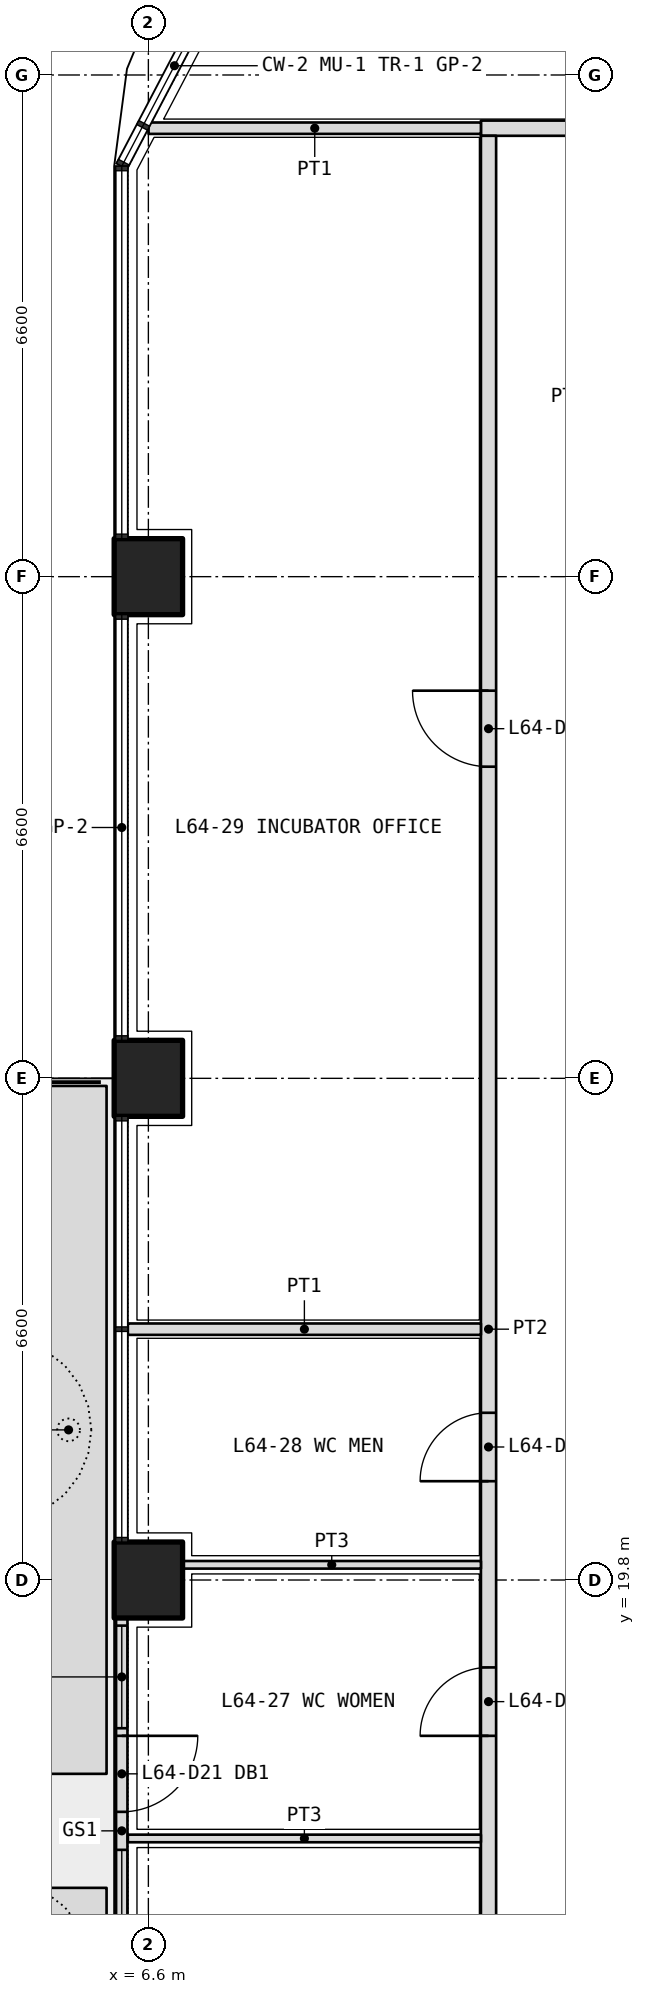
"""IFC4 building model, lengths in metres.
Left out: names, types, materials, properties, quantities, classifications, styles, units other than length and angle.
Written with IfcOpenShell. Run it as: python <this file> out.ifc"""

import sys

from ifc_helpers import new_model, si_unit, direction, frame, frame_2d, origin, origin_2d, place, context, subcontext, project, spatial, polyline, rectangle, outline, extrude, element, fill, save


model = new_model("IFC4")
c1 = context("Model", 3, precision=1e-05, world=origin(), true_north=direction((0.0, 1.0)))
c2 = subcontext(c1, "Body", "Model", "MODEL_VIEW")
j1 = project(units=[si_unit("LENGTHUNIT", "METRE"), si_unit("PLANEANGLEUNIT", "RADIAN")], contexts=[c1])
p1 = place(None, origin())
s1 = spatial("IfcSite", under=j1, at=p1, CompositionType="ELEMENT")
p2 = place(p1, origin())
s2 = spatial("IfcBuilding", under=s1, at=p2, CompositionType="ELEMENT")
p3 = place(p2, frame((0.0, 0.0, 279.6)))
s3 = spatial("IfcBuildingStorey", under=s2, at=p3, CompositionType="ELEMENT", Elevation=279.6)
for number, where, z_axis, x_axis in (
    (1, (6.6, 19.8, 0.0), (0.0, 0.0, 1.0), (0.0, 1.0, 0.0)),
    (2, (6.6, 26.4, 0.0), (0.0, 0.0, 1.0), (0.0, 1.0, 0.0)),
    (3, (6.6, 33.0, 0.0), (0.0, 0.0, 1.0), (0.0, 1.0, 0.0)),
):
    element("IfcColumn", number, at=place(p3, frame(where, z_axis=z_axis, x_axis=x_axis)), inside=s3, PredefinedType="COLUMN", context=c2, shape_type="SweptSolid", body=[
        extrude(rectangle(XDim=1.0, YDim=0.9, at=origin_2d()), origin(), (0.0, 0.0, 1.0), 4.2),
    ])
p4 = place(p3, origin())
e4 = element("IfcWall", 4, at=p4, inside=s3, PredefinedType="USERDEFINED", context=c2, shape_type="SweptSolid", body=[
    extrude(outline(polyline([(5.05, 13.3), (6.05, 13.3), (6.05, 15.75), (5.05, 15.75), (5.05, 13.3)]), holes=[polyline([(5.2, 13.45), (5.9, 13.45), (5.9, 15.6), (5.2, 15.6), (5.2, 13.45)])]), origin(), (0.0, 0.0, 1.0), 1.05),
])
p5 = place(p3, origin())
e5 = element("IfcWall", 5, at=p5, inside=s3, PredefinedType="USERDEFINED", context=c2, shape_type="SweptSolid", body=[
    extrude(outline(polyline([(5.05, 17.25), (6.05, 17.25), (6.05, 26.3), (5.05, 26.3), (5.05, 17.25)]), holes=[polyline([(5.2, 17.4), (5.9, 17.4), (5.9, 26.15), (5.2, 26.15), (5.2, 17.4)])]), origin(), (0.0, 0.0, 1.0), 1.05),
])
p6 = place(p3, frame((6.25, 19.3, 0.0), z_axis=(0.0, 0.0, 1.0), x_axis=(0.0, -1.0, 0.0)))
e6 = element("IfcWall", 6, at=p6, inside=s3, PredefinedType="SOLIDWALL", context=c2, shape_type="SweptSolid", body=[
    extrude(rectangle(XDim=5.6, YDim=0.15, at=frame_2d((2.8, 0.0))), origin(), (0.0, 0.0, 1.0), 2.7),
])
p7 = place(p6, frame((1.55, 0.0, 0.0)))
e7 = element("IfcOpeningElement", 7, at=p7, cuts=e6, PredefinedType="OPENING", context=c2, shape_type="SweptSolid", body=[
    extrude(rectangle(XDim=1.0, YDim=2.4, at=frame_2d((0.5, 1.2))), frame((0.0, 0.085, 0.0), z_axis=(0.0, -1.0, 0.0), x_axis=(1.0, 0.0, 0.0)), (0.0, 0.0, 1.0), 0.17),
])
p8 = place(p6, frame((0.1, 0.0, 0.1)))
e8 = element("IfcOpeningElement", 8, at=p8, cuts=e6, PredefinedType="OPENING", context=c2, shape_type="SweptSolid", body=[
    extrude(rectangle(XDim=1.35, YDim=2.3, at=frame_2d((0.675, 1.15))), frame((0.0, 0.085, 0.0), z_axis=(0.0, -1.0, 0.0), x_axis=(1.0, 0.0, 0.0)), (0.0, 0.0, 1.0), 0.17),
])
p9 = place(p6, frame((3.05, 0.0, 0.1)))
e9 = element("IfcOpeningElement", 9, at=p9, cuts=e6, PredefinedType="OPENING", context=c2, shape_type="SweptSolid", body=[
    extrude(rectangle(XDim=2.45, YDim=2.3, at=frame_2d((1.225, 1.15))), frame((0.0, 0.085, 0.0), z_axis=(0.0, -1.0, 0.0), x_axis=(1.0, 0.0, 0.0)), (0.0, 0.0, 1.0), 0.17),
])
p10 = place(p3, frame((10.975, 38.9, 0.0), z_axis=(0.0, 0.0, 1.0), x_axis=(1.0, 0.0, 0.0)))
e10 = element("IfcWall", 10, at=p10, inside=s3, PredefinedType="PARTITIONING", context=c2, shape_type="SweptSolid", body=[
    extrude(rectangle(XDim=30.85, YDim=0.2, at=frame_2d((15.425, 0.0))), origin(), (0.0, 0.0, 1.0), 3.0),
])
p11 = place(p10, frame((2.312, 0.0, 0.0)))
e11 = element("IfcOpeningElement", 11, at=p11, cuts=e10, PredefinedType="OPENING", context=c2, shape_type="SweptSolid", body=[
    extrude(rectangle(XDim=1.0, YDim=2.1, at=frame_2d((0.5, 1.05))), frame((0.0, 0.11, 0.0), z_axis=(0.0, -1.0, 0.0), x_axis=(1.0, 0.0, 0.0)), (0.0, 0.0, 1.0), 0.22),
])
p12 = place(p10, frame((7.125, 0.0, 0.0)))
e12 = element("IfcOpeningElement", 12, at=p12, cuts=e10, PredefinedType="OPENING", context=c2, shape_type="SweptSolid", body=[
    extrude(rectangle(XDim=1.0, YDim=2.1, at=frame_2d((0.5, 1.05))), frame((0.0, 0.11, 0.0), z_axis=(0.0, -1.0, 0.0), x_axis=(1.0, 0.0, 0.0)), (0.0, 0.0, 1.0), 0.22),
])
p13 = place(p10, frame((10.425, 0.0, 0.0)))
e13 = element("IfcOpeningElement", 13, at=p13, cuts=e10, PredefinedType="OPENING", context=c2, shape_type="SweptSolid", body=[
    extrude(rectangle(XDim=1.0, YDim=2.1, at=frame_2d((0.5, 1.05))), frame((0.0, 0.11, 0.0), z_axis=(0.0, -1.0, 0.0), x_axis=(1.0, 0.0, 0.0)), (0.0, 0.0, 1.0), 0.22),
])
p14 = place(p10, frame((13.275, 0.0, 0.0)))
e14 = element("IfcOpeningElement", 14, at=p14, cuts=e10, PredefinedType="OPENING", context=c2, shape_type="SweptSolid", body=[
    extrude(rectangle(XDim=1.0, YDim=2.1, at=frame_2d((0.5, 1.05))), frame((0.0, 0.11, 0.0), z_axis=(0.0, -1.0, 0.0), x_axis=(1.0, 0.0, 0.0)), (0.0, 0.0, 1.0), 0.22),
])
p15 = place(p10, frame((22.587, 0.0, 0.0)))
e15 = element("IfcOpeningElement", 15, at=p15, cuts=e10, PredefinedType="OPENING", context=c2, shape_type="SweptSolid", body=[
    extrude(rectangle(XDim=1.0, YDim=2.1, at=frame_2d((0.5, 1.05))), frame((0.0, 0.11, 0.0), z_axis=(0.0, -1.0, 0.0), x_axis=(1.0, 0.0, 0.0)), (0.0, 0.0, 1.0), 0.22),
])
p16 = place(p3, frame((11.075, 7.4, 0.0), z_axis=(0.0, 0.0, 1.0), x_axis=(0.0, 1.0, 0.0)))
e16 = element("IfcWall", 16, at=p16, inside=s3, PredefinedType="PARTITIONING", context=c2, shape_type="SweptSolid", body=[
    extrude(rectangle(XDim=31.4, YDim=0.2, at=frame_2d((15.7, 0.0))), origin(), (0.0, 0.0, 1.0), 3.0),
])
p17 = place(p16, frame((2.35, 0.0, 0.0)))
e17 = element("IfcOpeningElement", 17, at=p17, cuts=e16, PredefinedType="OPENING", context=c2, shape_type="SweptSolid", body=[
    extrude(rectangle(XDim=1.0, YDim=2.1, at=frame_2d((0.5, 1.05))), frame((0.0, 0.11, 0.0), z_axis=(0.0, -1.0, 0.0), x_axis=(1.0, 0.0, 0.0)), (0.0, 0.0, 1.0), 0.22),
])
p18 = place(p16, frame((6.9, 0.0, 0.0)))
e18 = element("IfcOpeningElement", 18, at=p18, cuts=e16, PredefinedType="OPENING", context=c2, shape_type="SweptSolid", body=[
    extrude(rectangle(XDim=1.0, YDim=2.1, at=frame_2d((0.5, 1.05))), frame((0.0, 0.11, 0.0), z_axis=(0.0, -1.0, 0.0), x_axis=(1.0, 0.0, 0.0)), (0.0, 0.0, 1.0), 0.22),
])
p19 = place(p16, frame((10.35, 0.0, 0.0)))
e19 = element("IfcOpeningElement", 19, at=p19, cuts=e16, PredefinedType="OPENING", context=c2, shape_type="SweptSolid", body=[
    extrude(rectangle(XDim=0.9, YDim=2.1, at=frame_2d((0.45, 1.05))), frame((0.0, 0.11, 0.0), z_axis=(0.0, -1.0, 0.0), x_axis=(1.0, 0.0, 0.0)), (0.0, 0.0, 1.0), 0.22),
])
p20 = place(p16, frame((13.7, 0.0, 0.0)))
e20 = element("IfcOpeningElement", 20, at=p20, cuts=e16, PredefinedType="OPENING", context=c2, shape_type="SweptSolid", body=[
    extrude(rectangle(XDim=0.9, YDim=2.1, at=frame_2d((0.45, 1.05))), frame((0.0, 0.11, 0.0), z_axis=(0.0, -1.0, 0.0), x_axis=(1.0, 0.0, 0.0)), (0.0, 0.0, 1.0), 0.22),
])
p21 = place(p16, frame((23.1, 0.0, 0.0)))
e21 = element("IfcOpeningElement", 21, at=p21, cuts=e16, PredefinedType="OPENING", context=c2, shape_type="SweptSolid", body=[
    extrude(rectangle(XDim=1.0, YDim=2.1, at=frame_2d((0.5, 1.05))), frame((0.0, 0.11, 0.0), z_axis=(0.0, -1.0, 0.0), x_axis=(1.0, 0.0, 0.0)), (0.0, 0.0, 1.0), 0.22),
])
p22 = place(p3, frame((6.603, 38.9, 0.0), z_axis=(0.0, 0.0, 1.0), x_axis=(1.0, 0.0, 0.0)))
e22 = element("IfcWall", 22, at=p22, inside=s3, PredefinedType="PARTITIONING", context=c2, shape_type="SweptSolid", body=[
    extrude(rectangle(XDim=4.373, YDim=0.15, at=frame_2d((2.186, 0.0))), origin(), (0.0, 0.0, 1.0), 2.7),
])
p23 = place(p3, frame((6.33, 16.4, 0.0), z_axis=(0.0, 0.0, 1.0), x_axis=(1.0, 0.0, 0.0)))
e23 = element("IfcWall", 23, at=p23, inside=s3, PredefinedType="PARTITIONING", context=c2, shape_type="SweptSolid", body=[
    extrude(rectangle(XDim=4.645, YDim=0.1, at=frame_2d((2.323, 0.0))), origin(), (0.0, 0.0, 1.0), 2.7),
])
p24 = place(p3, frame((7.05, 20.0, 0.0), z_axis=(0.0, 0.0, 1.0), x_axis=(1.0, 0.0, 0.0)))
e24 = element("IfcWall", 24, at=p24, inside=s3, PredefinedType="PARTITIONING", context=c2, shape_type="SweptSolid", body=[
    extrude(rectangle(XDim=3.925, YDim=0.1, at=frame_2d((1.962, 0.0))), origin(), (0.0, 0.0, 1.0), 3.0),
])
p25 = place(p3, frame((6.33, 23.1, 0.0), z_axis=(0.0, 0.0, 1.0), x_axis=(1.0, 0.0, 0.0)))
e25 = element("IfcWall", 25, at=p25, inside=s3, PredefinedType="PARTITIONING", context=c2, shape_type="SweptSolid", body=[
    extrude(rectangle(XDim=4.645, YDim=0.15, at=frame_2d((2.323, 0.0))), origin(), (0.0, 0.0, 1.0), 2.7),
])
p26 = place(p7, origin())
e26 = element("IfcDoor", 26, at=p26, inside=s3, OperationType="SINGLE_SWING_LEFT", PredefinedType="DOOR", context=c2, shape_type="SweptSolid", body=[
    extrude(rectangle(XDim=1.0, YDim=2.4, at=frame_2d((0.5, 1.2))), frame((0.0, 0.025, 0.0), z_axis=(0.0, -1.0, 0.0), x_axis=(1.0, 0.0, 0.0)), (0.0, 0.0, 1.0), 0.05),
])
fill(e7, e26)
p27 = place(p8, origin())
e27 = element("IfcWindow", 27, at=p27, inside=s3, PartitioningType="SINGLE_PANEL", PredefinedType="WINDOW", context=c2, shape_type="SweptSolid", body=[
    extrude(rectangle(XDim=1.35, YDim=2.3, at=frame_2d((0.675, 1.15))), frame((0.0, 0.03, 0.0), z_axis=(0.0, -1.0, 0.0), x_axis=(1.0, 0.0, 0.0)), (0.0, 0.0, 1.0), 0.06),
])
fill(e8, e27)
p28 = place(p9, origin())
e28 = element("IfcWindow", 28, at=p28, inside=s3, PartitioningType="SINGLE_PANEL", PredefinedType="WINDOW", context=c2, shape_type="SweptSolid", body=[
    extrude(rectangle(XDim=2.45, YDim=2.3, at=frame_2d((1.225, 1.15))), frame((0.0, 0.03, 0.0), z_axis=(0.0, -1.0, 0.0), x_axis=(1.0, 0.0, 0.0)), (0.0, 0.0, 1.0), 0.06),
])
fill(e9, e28)
p29 = place(p19, origin())
e29 = element("IfcDoor", 29, at=p29, inside=s3, OperationType="SINGLE_SWING_LEFT", PredefinedType="DOOR", context=c2, shape_type="SweptSolid", body=[
    extrude(rectangle(XDim=0.9, YDim=2.1, at=frame_2d((0.45, 1.05))), frame((0.0, 0.025, 0.0), z_axis=(0.0, -1.0, 0.0), x_axis=(1.0, 0.0, 0.0)), (0.0, 0.0, 1.0), 0.05),
])
fill(e19, e29)
p30 = place(p20, origin())
e30 = element("IfcDoor", 30, at=p30, inside=s3, OperationType="SINGLE_SWING_LEFT", PredefinedType="DOOR", context=c2, shape_type="SweptSolid", body=[
    extrude(rectangle(XDim=0.9, YDim=2.1, at=frame_2d((0.45, 1.05))), frame((0.0, 0.025, 0.0), z_axis=(0.0, -1.0, 0.0), x_axis=(1.0, 0.0, 0.0)), (0.0, 0.0, 1.0), 0.05),
])
fill(e20, e30)
p31 = place(p21, origin())
e31 = element("IfcDoor", 31, at=p31, inside=s3, OperationType="SINGLE_SWING_RIGHT", PredefinedType="DOOR", context=c2, shape_type="SweptSolid", body=[
    extrude(rectangle(XDim=1.0, YDim=2.1, at=frame_2d((0.5, 1.05))), frame((0.0, 0.025, 0.0), z_axis=(0.0, -1.0, 0.0), x_axis=(1.0, 0.0, 0.0)), (0.0, 0.0, 1.0), 0.05),
])
fill(e21, e31)
save(model, sys.argv[1])
